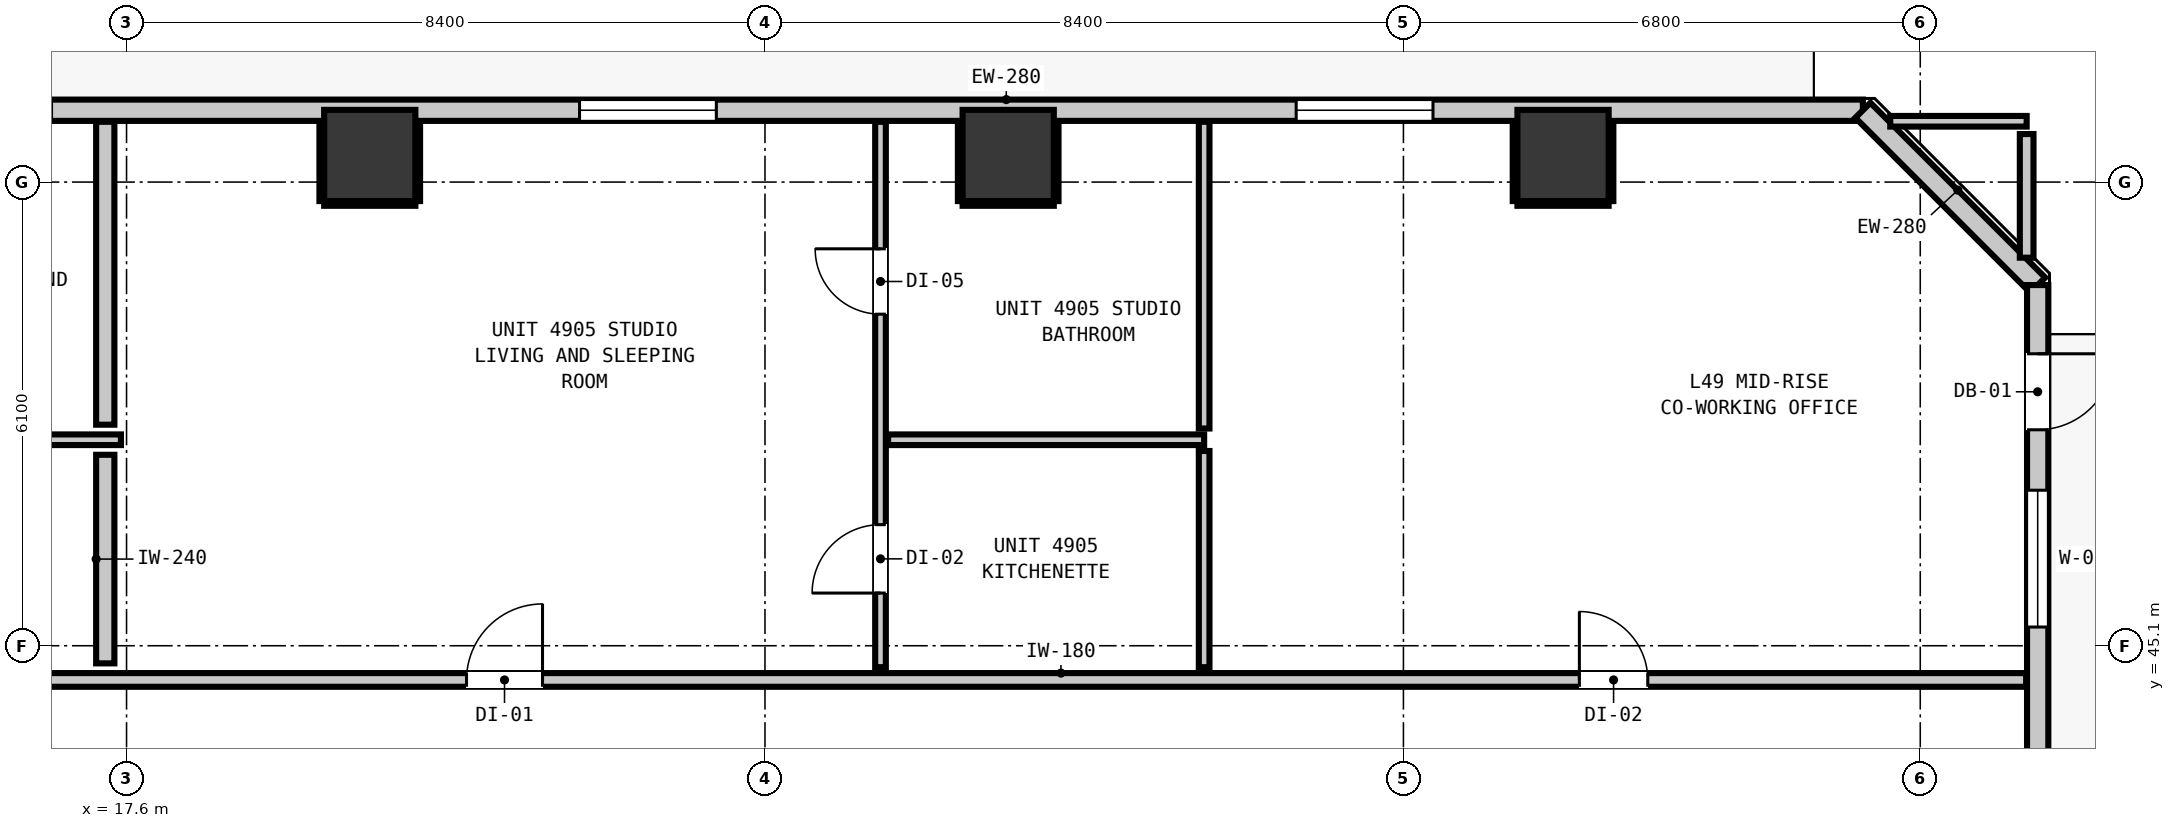
"""IFC4 building model, lengths in metres.
Left out: names, types, materials, properties, quantities, classifications, styles, units other than length and angle.
Written with IfcOpenShell. Run it as: python <this file> out.ifc"""

import sys

from ifc_helpers import new_model, si_unit, direction, frame, frame_2d, origin, origin_2d, place, context, subcontext, project, spatial, rectangle, extrude, element, fill, save


model = new_model("IFC4")
c1 = context("Model", 3, precision=1e-05, world=origin(), true_north=direction((0.0, 1.0)))
c2 = subcontext(c1, "Body", "Model", "MODEL_VIEW")
j1 = project(units=[si_unit("LENGTHUNIT", "METRE"), si_unit("PLANEANGLEUNIT", "RADIAN")], contexts=[c1])
p1 = place(None, origin())
s1 = spatial("IfcSite", under=j1, at=p1, CompositionType="ELEMENT")
p2 = place(p1, origin())
s2 = spatial("IfcBuilding", under=s1, at=p2, CompositionType="ELEMENT")
p3 = place(p2, frame((0.0, 0.0, 169.16)))
s3 = spatial("IfcBuildingStorey", under=s2, at=p3, CompositionType="ELEMENT", Elevation=169.16)
for number, where, z_axis, x_axis in (
    (1, (20.8, 51.55, 0.0), (0.0, 0.0, 1.0), (1.0, 0.0, 0.0)),
    (2, (29.2, 51.55, 0.0), (0.0, 0.0, 1.0), (1.0, 0.0, 0.0)),
    (3, (36.5, 51.55, 0.0), (0.0, 0.0, 1.0), (1.0, 0.0, 0.0)),
):
    element("IfcColumn", number, at=place(p3, frame(where, z_axis=z_axis, x_axis=x_axis)), inside=s3, PredefinedType="COLUMN", context=c2, shape_type="SweptSolid", body=[
        extrude(rectangle(XDim=1.2, YDim=1.2, at=origin_2d()), origin(), (0.0, 0.0, 1.0), 3.32),
    ])
p4 = place(p3, frame((5.355, 52.145, 0.0), z_axis=(0.0, 0.0, 1.0), x_axis=(1.0, 0.0, 0.0)))
e4 = element("IfcWall", 4, at=p4, inside=s3, PredefinedType="STANDARD", context=c2, shape_type="SweptSolid", body=[
    extrude(rectangle(XDim=35.09, YDim=0.28, at=frame_2d((17.545, 0.0))), origin(), (0.0, 0.0, 1.0), 2.96),
])
p5 = place(p4, frame((2.658, 0.0, 0.0)))
e5 = element("IfcOpeningElement", 5, at=p5, cuts=e4, PredefinedType="OPENING", context=c2, shape_type="SweptSolid", body=[
    extrude(rectangle(XDim=1.0, YDim=2.15, at=frame_2d((0.5, 1.075))), frame((0.0, 0.15, 0.0), z_axis=(0.0, -1.0, 0.0), x_axis=(1.0, 0.0, 0.0)), (0.0, 0.0, 1.0), 0.3),
])
p6 = place(p4, frame((4.212, 0.0, 0.85)))
e6 = element("IfcOpeningElement", 6, at=p6, cuts=e4, PredefinedType="OPENING", context=c2, shape_type="SweptSolid", body=[
    extrude(rectangle(XDim=1.8, YDim=1.9, at=frame_2d((0.9, 0.95))), frame((0.0, 0.15, 0.0), z_axis=(0.0, -1.0, 0.0), x_axis=(1.0, 0.0, 0.0)), (0.0, 0.0, 1.0), 0.3),
])
p7 = place(p4, frame((0.541, 0.0, 0.85)))
e7 = element("IfcOpeningElement", 7, at=p7, cuts=e4, PredefinedType="OPENING", context=c2, shape_type="SweptSolid", body=[
    extrude(rectangle(XDim=1.05, YDim=1.65, at=frame_2d((0.525, 0.825))), frame((0.0, 0.15, 0.0), z_axis=(0.0, -1.0, 0.0), x_axis=(1.0, 0.0, 0.0)), (0.0, 0.0, 1.0), 0.3),
])
p8 = place(p4, frame((9.458, 0.0, 0.85)))
e8 = element("IfcOpeningElement", 8, at=p8, cuts=e4, PredefinedType="OPENING", context=c2, shape_type="SweptSolid", body=[
    extrude(rectangle(XDim=1.8, YDim=1.9, at=frame_2d((0.9, 0.95))), frame((0.0, 0.15, 0.0), z_axis=(0.0, -1.0, 0.0), x_axis=(1.0, 0.0, 0.0)), (0.0, 0.0, 1.0), 0.3),
])
p9 = place(p4, frame((18.205, 0.0, 0.85)))
e9 = element("IfcOpeningElement", 9, at=p9, cuts=e4, PredefinedType="OPENING", context=c2, shape_type="SweptSolid", body=[
    extrude(rectangle(XDim=1.8, YDim=1.9, at=frame_2d((0.9, 0.95))), frame((0.0, 0.15, 0.0), z_axis=(0.0, -1.0, 0.0), x_axis=(1.0, 0.0, 0.0)), (0.0, 0.0, 1.0), 0.3),
])
p10 = place(p4, frame((27.634, 0.0, 0.85)))
e10 = element("IfcOpeningElement", 10, at=p10, cuts=e4, PredefinedType="OPENING", context=c2, shape_type="SweptSolid", body=[
    extrude(rectangle(XDim=1.8, YDim=1.9, at=frame_2d((0.9, 0.95))), frame((0.0, 0.15, 0.0), z_axis=(0.0, -1.0, 0.0), x_axis=(1.0, 0.0, 0.0)), (0.0, 0.0, 1.0), 0.3),
])
p11 = place(p3, frame((40.445, 52.145, 0.0), z_axis=(0.0, 0.0, 1.0), x_axis=(0.707106781187, -0.707106781187, 0.0)))
e11 = element("IfcWall", 11, at=p11, inside=s3, PredefinedType="STANDARD", context=c2, shape_type="SweptSolid", body=[
    extrude(rectangle(XDim=3.253, YDim=0.28, at=frame_2d((1.626, 0.0))), origin(), (0.0, 0.0, 1.0), 2.96),
])
p12 = place(p3, frame((42.745, 49.845, 0.0), z_axis=(0.0, 0.0, 1.0), x_axis=(0.0, -1.0, 0.0)))
e12 = element("IfcWall", 12, at=p12, inside=s3, PredefinedType="STANDARD", context=c2, shape_type="SweptSolid", body=[
    extrude(rectangle(XDim=32.29, YDim=0.28, at=frame_2d((16.145, 0.0))), origin(), (0.0, 0.0, 1.0), 2.96),
])
p13 = place(p12, frame((0.904, 0.0, 0.0)))
e13 = element("IfcOpeningElement", 13, at=p13, cuts=e12, PredefinedType="OPENING", context=c2, shape_type="SweptSolid", body=[
    extrude(rectangle(XDim=1.0, YDim=2.15, at=frame_2d((0.5, 1.075))), frame((0.0, 0.15, 0.0), z_axis=(0.0, -1.0, 0.0), x_axis=(1.0, 0.0, 0.0)), (0.0, 0.0, 1.0), 0.3),
])
p14 = place(p12, frame((2.699, 0.0, 0.85)))
e14 = element("IfcOpeningElement", 14, at=p14, cuts=e12, PredefinedType="OPENING", context=c2, shape_type="SweptSolid", body=[
    extrude(rectangle(XDim=1.8, YDim=1.9, at=frame_2d((0.9, 0.95))), frame((0.0, 0.15, 0.0), z_axis=(0.0, -1.0, 0.0), x_axis=(1.0, 0.0, 0.0)), (0.0, 0.0, 1.0), 0.3),
])
p15 = place(p12, frame((23.02, 0.0, 0.85)))
e15 = element("IfcOpeningElement", 15, at=p15, cuts=e12, PredefinedType="OPENING", context=c2, shape_type="SweptSolid", body=[
    extrude(rectangle(XDim=1.8, YDim=1.9, at=frame_2d((0.9, 0.95))), frame((0.0, 0.15, 0.0), z_axis=(0.0, -1.0, 0.0), x_axis=(1.0, 0.0, 0.0)), (0.0, 0.0, 1.0), 0.3),
])
p16 = place(p12, frame((13.47, 0.0, 0.85)))
e16 = element("IfcOpeningElement", 16, at=p16, cuts=e12, PredefinedType="OPENING", context=c2, shape_type="SweptSolid", body=[
    extrude(rectangle(XDim=1.8, YDim=1.9, at=frame_2d((0.9, 0.95))), frame((0.0, 0.15, 0.0), z_axis=(0.0, -1.0, 0.0), x_axis=(1.0, 0.0, 0.0)), (0.0, 0.0, 1.0), 0.3),
])
p17 = place(p3, frame((3.207, 44.65, 0.0), z_axis=(0.0, 0.0, 1.0), x_axis=(1.0, 0.0, 0.0)))
e17 = element("IfcWall", 17, at=p17, inside=s3, PredefinedType="PARTITIONING", context=c2, shape_type="SweptSolid", body=[
    extrude(rectangle(XDim=39.386, YDim=0.18, at=frame_2d((19.693, 0.0))), origin(), (0.0, 0.0, 1.0), 2.96),
])
p18 = place(p17, frame((5.952, 0.0, 0.0)))
e18 = element("IfcOpeningElement", 18, at=p18, cuts=e17, PredefinedType="OPENING", context=c2, shape_type="SweptSolid", body=[
    extrude(rectangle(XDim=1.0, YDim=2.15, at=frame_2d((0.5, 1.075))), frame((0.0, 0.1, 0.0), z_axis=(0.0, -1.0, 0.0), x_axis=(1.0, 0.0, 0.0)), (0.0, 0.0, 1.0), 0.2),
])
p19 = place(p17, frame((18.866, 0.0, 0.0)))
e19 = element("IfcOpeningElement", 19, at=p19, cuts=e17, PredefinedType="OPENING", context=c2, shape_type="SweptSolid", body=[
    extrude(rectangle(XDim=1.0, YDim=2.15, at=frame_2d((0.5, 1.075))), frame((0.0, 0.1, 0.0), z_axis=(0.0, -1.0, 0.0), x_axis=(1.0, 0.0, 0.0)), (0.0, 0.0, 1.0), 0.2),
])
p20 = place(p17, frame((33.508, 0.0, 0.0)))
e20 = element("IfcOpeningElement", 20, at=p20, cuts=e17, PredefinedType="OPENING", context=c2, shape_type="SweptSolid", body=[
    extrude(rectangle(XDim=0.9, YDim=2.1, at=frame_2d((0.45, 1.05))), frame((0.0, 0.1, 0.0), z_axis=(0.0, -1.0, 0.0), x_axis=(1.0, 0.0, 0.0)), (0.0, 0.0, 1.0), 0.2),
])
p21 = place(p3, frame((11.82, 47.81, 0.0), z_axis=(0.0, 0.0, 1.0), x_axis=(1.0, 0.0, 0.0)))
e21 = element("IfcWall", 21, at=p21, inside=s3, PredefinedType="PARTITIONING", context=c2, shape_type="SweptSolid", body=[
    extrude(rectangle(XDim=5.706, YDim=0.14, at=frame_2d((2.853, 0.0))), origin(), (0.0, 0.0, 1.0), 2.96),
])
p22 = place(p3, frame((27.62, 47.81, 0.0), z_axis=(0.0, 0.0, 1.0), x_axis=(1.0, 0.0, 0.0)))
e22 = element("IfcWall", 22, at=p22, inside=s3, PredefinedType="PARTITIONING", context=c2, shape_type="SweptSolid", body=[
    extrude(rectangle(XDim=4.158, YDim=0.14, at=frame_2d((2.079, 0.0))), origin(), (0.0, 0.0, 1.0), 2.96),
])
p23 = place(p3, frame((40.805, 52.0, 0.0), z_axis=(0.0, 0.0, 1.0), x_axis=(1.0, 0.0, 0.0)))
e23 = element("IfcWall", 23, at=p23, inside=s3, PredefinedType="PARTITIONING", context=c2, shape_type="SweptSolid", body=[
    extrude(rectangle(XDim=1.795, YDim=0.14, at=frame_2d((0.897, 0.0))), origin(), (0.0, 0.0, 1.0), 2.96),
])
p24 = place(p3, frame((17.32, 44.868, 0.0), z_axis=(0.0, 0.0, 1.0), x_axis=(0.0, 1.0, 0.0)))
e24 = element("IfcWall", 24, at=p24, inside=s3, PredefinedType="PARTITIONING", context=c2, shape_type="SweptSolid", body=[
    extrude(rectangle(XDim=2.744, YDim=0.24, at=frame_2d((1.372, 0.0))), origin(), (0.0, 0.0, 1.0), 2.96),
])
p25 = place(p3, frame((17.32, 48.008, 0.0), z_axis=(0.0, 0.0, 1.0), x_axis=(0.0, 1.0, 0.0)))
e25 = element("IfcWall", 25, at=p25, inside=s3, PredefinedType="PARTITIONING", context=c2, shape_type="SweptSolid", body=[
    extrude(rectangle(XDim=3.985, YDim=0.24, at=frame_2d((1.992, 0.0))), origin(), (0.0, 0.0, 1.0), 2.96),
])
p26 = place(p3, frame((42.6, 50.205, 0.0), z_axis=(0.0, 0.0, 1.0), x_axis=(0.0, 1.0, 0.0)))
e26 = element("IfcWall", 26, at=p26, inside=s3, PredefinedType="PARTITIONING", context=c2, shape_type="SweptSolid", body=[
    extrude(rectangle(XDim=1.627, YDim=0.18, at=frame_2d((0.813, 0.0))), origin(), (0.0, 0.0, 1.0), 2.96),
])
p27 = place(p3, frame((27.52, 44.818, 0.0), z_axis=(0.0, 0.0, 1.0), x_axis=(0.0, 1.0, 0.0)))
e27 = element("IfcWall", 27, at=p27, inside=s3, PredefinedType="PARTITIONING", context=c2, shape_type="SweptSolid", body=[
    extrude(rectangle(XDim=7.175, YDim=0.14, at=frame_2d((3.587, 0.0))), origin(), (0.0, 0.0, 1.0), 2.96),
])
p28 = place(p27, frame((0.975, 0.0, 0.0)))
e28 = element("IfcOpeningElement", 28, at=p28, cuts=e27, PredefinedType="OPENING", context=c2, shape_type="SweptSolid", body=[
    extrude(rectangle(XDim=0.9, YDim=2.1, at=frame_2d((0.45, 1.05))), frame((0.0, 0.08, 0.0), z_axis=(0.0, -1.0, 0.0), x_axis=(1.0, 0.0, 0.0)), (0.0, 0.0, 1.0), 0.16),
])
p29 = place(p27, frame((4.644, 0.0, 0.0)))
e29 = element("IfcOpeningElement", 29, at=p29, cuts=e27, PredefinedType="OPENING", context=c2, shape_type="SweptSolid", body=[
    extrude(rectangle(XDim=0.86, YDim=2.02, at=frame_2d((0.43, 1.01))), frame((0.0, 0.08, 0.0), z_axis=(0.0, -1.0, 0.0), x_axis=(1.0, 0.0, 0.0)), (0.0, 0.0, 1.0), 0.16),
])
p30 = place(p3, frame((31.778, 44.818, 0.0), z_axis=(0.0, 0.0, 1.0), x_axis=(0.0, 1.0, 0.0)))
e30 = element("IfcWall", 30, at=p30, inside=s3, PredefinedType="PARTITIONING", context=c2, shape_type="SweptSolid", body=[
    extrude(rectangle(XDim=2.844, YDim=0.14, at=frame_2d((1.422, 0.0))), origin(), (0.0, 0.0, 1.0), 2.96),
])
p31 = place(p3, frame((31.778, 47.958, 0.0), z_axis=(0.0, 0.0, 1.0), x_axis=(0.0, 1.0, 0.0)))
e31 = element("IfcWall", 31, at=p31, inside=s3, PredefinedType="PARTITIONING", context=c2, shape_type="SweptSolid", body=[
    extrude(rectangle(XDim=4.035, YDim=0.14, at=frame_2d((2.018, 0.0))), origin(), (0.0, 0.0, 1.0), 2.96),
])
p32 = place(p3, frame((20.2, 50.918, 0.0), z_axis=(0.0, 0.0, 1.0), x_axis=(1.0, 0.0, 0.0)))
e32 = element("IfcWall", 32, at=p32, inside=s3, PredefinedType="PARTITIONING", context=c2, shape_type="SweptSolid", body=[
    extrude(rectangle(XDim=1.2, YDim=0.06, at=frame_2d((0.6, 0.0))), origin(), (0.0, 0.0, 1.0), 1.45),
])
for number, where, z_axis, x_axis in (
    (33, (20.168, 50.95, 0.0), (0.0, 0.0, 1.0), (0.0, 1.0, 0.0)),
    (34, (21.432, 50.95, 0.0), (0.0, 0.0, 1.0), (0.0, 1.0, 0.0)),
):
    element("IfcWall", number, at=place(p3, frame(where, z_axis=z_axis, x_axis=x_axis)), inside=s3, PredefinedType="PARTITIONING", context=c2, shape_type="SweptSolid", body=[
        extrude(rectangle(XDim=1.04, YDim=0.06, at=frame_2d((0.52, 0.0))), origin(), (0.0, 0.0, 1.0), 1.45),
    ])
p33 = place(p3, frame((28.6, 50.918, 0.0), z_axis=(0.0, 0.0, 1.0), x_axis=(1.0, 0.0, 0.0)))
e35 = element("IfcWall", 35, at=p33, inside=s3, PredefinedType="PARTITIONING", context=c2, shape_type="SweptSolid", body=[
    extrude(rectangle(XDim=1.2, YDim=0.06, at=frame_2d((0.6, 0.0))), origin(), (0.0, 0.0, 1.0), 1.45),
])
for number, where, z_axis, x_axis in (
    (36, (28.568, 50.95, 0.0), (0.0, 0.0, 1.0), (0.0, 1.0, 0.0)),
    (37, (29.832, 50.95, 0.0), (0.0, 0.0, 1.0), (0.0, 1.0, 0.0)),
):
    element("IfcWall", number, at=place(p3, frame(where, z_axis=z_axis, x_axis=x_axis)), inside=s3, PredefinedType="PARTITIONING", context=c2, shape_type="SweptSolid", body=[
        extrude(rectangle(XDim=1.04, YDim=0.06, at=frame_2d((0.52, 0.0))), origin(), (0.0, 0.0, 1.0), 1.45),
    ])
p34 = place(p3, frame((35.9, 50.918, 0.0), z_axis=(0.0, 0.0, 1.0), x_axis=(1.0, 0.0, 0.0)))
e38 = element("IfcWall", 38, at=p34, inside=s3, PredefinedType="PARTITIONING", context=c2, shape_type="SweptSolid", body=[
    extrude(rectangle(XDim=1.2, YDim=0.06, at=frame_2d((0.6, 0.0))), origin(), (0.0, 0.0, 1.0), 1.45),
])
for number, where, z_axis, x_axis in (
    (39, (35.868, 50.95, 0.0), (0.0, 0.0, 1.0), (0.0, 1.0, 0.0)),
    (40, (37.132, 50.95, 0.0), (0.0, 0.0, 1.0), (0.0, 1.0, 0.0)),
):
    element("IfcWall", number, at=place(p3, frame(where, z_axis=z_axis, x_axis=x_axis)), inside=s3, PredefinedType="PARTITIONING", context=c2, shape_type="SweptSolid", body=[
        extrude(rectangle(XDim=1.04, YDim=0.06, at=frame_2d((0.52, 0.0))), origin(), (0.0, 0.0, 1.0), 1.45),
    ])
p35 = place(p13, origin())
e41 = element("IfcDoor", 41, at=p35, inside=s3, OperationType="SINGLE_SWING_LEFT", PredefinedType="DOOR", context=c2, shape_type="SweptSolid", body=[
    extrude(rectangle(XDim=1.0, YDim=2.15, at=frame_2d((0.5, 1.075))), frame((0.0, 0.025, 0.0), z_axis=(0.0, -1.0, 0.0), x_axis=(1.0, 0.0, 0.0)), (0.0, 0.0, 1.0), 0.05),
])
fill(e13, e41)
p36 = place(p9, origin())
e42 = element("IfcWindow", 42, at=p36, inside=s3, PartitioningType="SINGLE_PANEL", PredefinedType="WINDOW", context=c2, shape_type="SweptSolid", body=[
    extrude(rectangle(XDim=1.8, YDim=1.9, at=frame_2d((0.9, 0.95))), frame((0.0, 0.03, 0.0), z_axis=(0.0, -1.0, 0.0), x_axis=(1.0, 0.0, 0.0)), (0.0, 0.0, 1.0), 0.06),
])
fill(e9, e42)
p37 = place(p10, origin())
e43 = element("IfcWindow", 43, at=p37, inside=s3, PartitioningType="SINGLE_PANEL", PredefinedType="WINDOW", context=c2, shape_type="SweptSolid", body=[
    extrude(rectangle(XDim=1.8, YDim=1.9, at=frame_2d((0.9, 0.95))), frame((0.0, 0.03, 0.0), z_axis=(0.0, -1.0, 0.0), x_axis=(1.0, 0.0, 0.0)), (0.0, 0.0, 1.0), 0.06),
])
fill(e10, e43)
p38 = place(p14, origin())
e44 = element("IfcWindow", 44, at=p38, inside=s3, PartitioningType="SINGLE_PANEL", PredefinedType="WINDOW", context=c2, shape_type="SweptSolid", body=[
    extrude(rectangle(XDim=1.8, YDim=1.9, at=frame_2d((0.9, 0.95))), frame((0.0, 0.03, 0.0), z_axis=(0.0, -1.0, 0.0), x_axis=(1.0, 0.0, 0.0)), (0.0, 0.0, 1.0), 0.06),
])
fill(e14, e44)
p39 = place(p19, origin())
e45 = element("IfcDoor", 45, at=p39, inside=s3, OperationType="SINGLE_SWING_RIGHT", PredefinedType="DOOR", context=c2, shape_type="SweptSolid", body=[
    extrude(rectangle(XDim=1.0, YDim=2.15, at=frame_2d((0.5, 1.075))), frame((0.0, 0.025, 0.0), z_axis=(0.0, -1.0, 0.0), x_axis=(1.0, 0.0, 0.0)), (0.0, 0.0, 1.0), 0.05),
])
fill(e19, e45)
p40 = place(p28, origin())
e46 = element("IfcDoor", 46, at=p40, inside=s3, OperationType="SINGLE_SWING_LEFT", PredefinedType="DOOR", context=c2, shape_type="SweptSolid", body=[
    extrude(rectangle(XDim=0.9, YDim=2.1, at=frame_2d((0.45, 1.05))), frame((0.0, 0.025, 0.0), z_axis=(0.0, -1.0, 0.0), x_axis=(1.0, 0.0, 0.0)), (0.0, 0.0, 1.0), 0.05),
])
fill(e28, e46)
p41 = place(p29, origin())
e47 = element("IfcDoor", 47, at=p41, inside=s3, OperationType="SINGLE_SWING_RIGHT", PredefinedType="DOOR", context=c2, shape_type="SweptSolid", body=[
    extrude(rectangle(XDim=0.86, YDim=2.02, at=frame_2d((0.43, 1.01))), frame((0.0, 0.025, 0.0), z_axis=(0.0, -1.0, 0.0), x_axis=(1.0, 0.0, 0.0)), (0.0, 0.0, 1.0), 0.05),
])
fill(e29, e47)
p42 = place(p20, origin())
e48 = element("IfcDoor", 48, at=p42, inside=s3, OperationType="SINGLE_SWING_LEFT", PredefinedType="DOOR", context=c2, shape_type="SweptSolid", body=[
    extrude(rectangle(XDim=0.9, YDim=2.1, at=frame_2d((0.45, 1.05))), frame((0.0, 0.025, 0.0), z_axis=(0.0, -1.0, 0.0), x_axis=(1.0, 0.0, 0.0)), (0.0, 0.0, 1.0), 0.05),
])
fill(e20, e48)
save(model, sys.argv[1])
